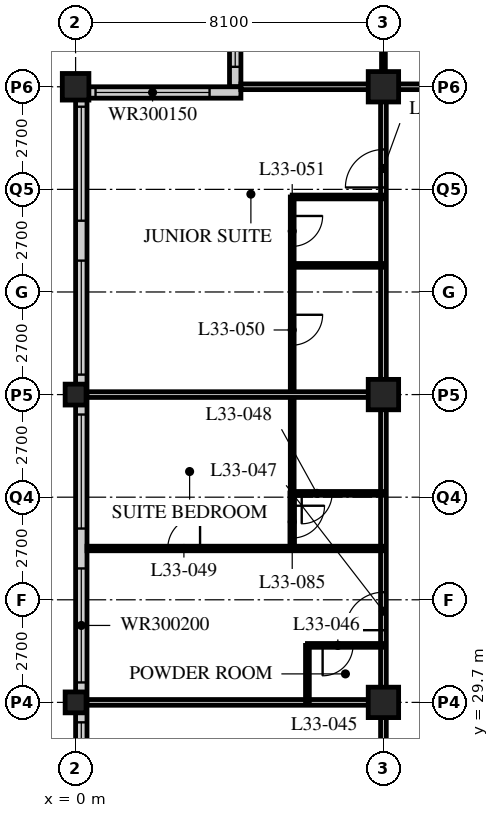
"""IFC4 building model, lengths in metres.
Left out: names, types, materials, properties, quantities, classifications, styles, units other than length and angle.
Written with IfcOpenShell. Run it as: python <this file> out.ifc"""

import sys

from ifc_helpers import new_model, si_unit, direction, frame, frame_2d, origin, origin_2d, place, context, subcontext, project, spatial, rectangle, hollow_rectangle, extrude, element, fill, save


model = new_model("IFC4")
c1 = context("Model", 3, precision=1e-05, world=origin(), true_north=direction((0.0, 1.0)))
c2 = subcontext(c1, "Body", "Model", "MODEL_VIEW")
j1 = project(units=[si_unit("LENGTHUNIT", "METRE"), si_unit("PLANEANGLEUNIT", "RADIAN")], contexts=[c1])
p1 = place(None, origin())
s1 = spatial("IfcSite", under=j1, at=p1, CompositionType="ELEMENT")
p2 = place(p1, origin())
s2 = spatial("IfcBuilding", under=s1, at=p2, CompositionType="ELEMENT")
p3 = place(p2, frame((0.0, 0.0, 130.6)))
s3 = spatial("IfcBuildingStorey", under=s2, at=p3, CompositionType="ELEMENT", Elevation=130.6)
for number, where, z_axis, x_axis in (
    (1, (0.0, 29.7, 0.0), (0.0, 0.0, 1.0), (1.0, 0.0, 0.0)),
    (2, (0.0, 37.8, 0.0), (0.0, 0.0, 1.0), (1.0, 0.0, 0.0)),
):
    element("IfcColumn", number, at=place(p3, frame(where, z_axis=z_axis, x_axis=x_axis)), inside=s3, PredefinedType="COLUMN", context=c2, shape_type="SweptSolid", body=[
        extrude(hollow_rectangle(XDim=0.55, YDim=0.55, WallThickness=0.04, at=origin_2d()), origin(), (0.0, 0.0, 1.0), 3.4),
    ])
p4 = place(p3, frame((0.0, 45.9, 0.0), z_axis=(0.0, 0.0, 1.0), x_axis=(1.0, 0.0, 0.0)))
e3 = element("IfcColumn", 3, at=p4, inside=s3, PredefinedType="COLUMN", context=c2, shape_type="SweptSolid", body=[
    extrude(hollow_rectangle(XDim=0.7, YDim=0.7, WallThickness=0.07, at=origin_2d()), origin(), (0.0, 0.0, 1.0), 3.4),
])
for number, where, z_axis, x_axis in (
    (4, (8.1, 29.7, 0.0), (0.0, 0.0, 1.0), (1.0, 0.0, 0.0)),
    (5, (8.1, 37.8, 0.0), (0.0, 0.0, 1.0), (1.0, 0.0, 0.0)),
    (6, (8.1, 45.9, 0.0), (0.0, 0.0, 1.0), (1.0, 0.0, 0.0)),
):
    element("IfcColumn", number, at=place(p3, frame(where, z_axis=z_axis, x_axis=x_axis)), inside=s3, PredefinedType="COLUMN", context=c2, shape_type="SweptSolid", body=[
        extrude(hollow_rectangle(XDim=0.8, YDim=0.8, WallThickness=0.08, at=origin_2d()), origin(), (0.0, 0.0, 1.0), 3.4),
    ])
p5 = place(p3, frame((4.2, 49.65, 0.0), z_axis=(0.0, 0.0, 1.0), x_axis=(0.0, -1.0, 0.0)))
e7 = element("IfcWall", 7, at=p5, inside=s3, PredefinedType="SOLIDWALL", context=c2, shape_type="SweptSolid", body=[
    extrude(rectangle(XDim=3.75, YDim=0.3, at=frame_2d((1.875, 0.0))), origin(), (0.0, 0.0, 1.0), 3.19),
])
p6 = place(p5, frame((0.225, 0.0, 0.9)))
e8 = element("IfcOpeningElement", 8, at=p6, cuts=e7, PredefinedType="OPENING", context=c2, shape_type="SweptSolid", body=[
    extrude(rectangle(XDim=3.0, YDim=1.5, at=frame_2d((1.5, 0.75))), frame((0.0, 0.16, 0.0), z_axis=(0.0, -1.0, 0.0), x_axis=(1.0, 0.0, 0.0)), (0.0, 0.0, 1.0), 0.32),
])
p7 = place(p3, frame((4.35, 45.75, 0.0), z_axis=(0.0, 0.0, 1.0), x_axis=(-1.0, 0.0, 0.0)))
e9 = element("IfcWall", 9, at=p7, inside=s3, PredefinedType="SOLIDWALL", context=c2, shape_type="SweptSolid", body=[
    extrude(rectangle(XDim=4.35, YDim=0.3, at=frame_2d((2.175, 0.0))), origin(), (0.0, 0.0, 1.0), 3.19),
])
p8 = place(p7, frame((0.825, 0.0, 0.9)))
e10 = element("IfcOpeningElement", 10, at=p8, cuts=e9, PredefinedType="OPENING", context=c2, shape_type="SweptSolid", body=[
    extrude(rectangle(XDim=3.0, YDim=1.5, at=frame_2d((1.5, 0.75))), frame((0.0, 0.16, 0.0), z_axis=(0.0, -1.0, 0.0), x_axis=(1.0, 0.0, 0.0)), (0.0, 0.0, 1.0), 0.32),
])
p9 = place(p3, frame((0.15, 45.6, 0.0), z_axis=(0.0, 0.0, 1.0), x_axis=(0.0, -1.0, 0.0)))
e11 = element("IfcWall", 11, at=p9, inside=s3, PredefinedType="SOLIDWALL", context=c2, shape_type="SweptSolid", body=[
    extrude(rectangle(XDim=32.1, YDim=0.3, at=frame_2d((16.05, 0.0))), origin(), (0.0, 0.0, 1.0), 3.19),
])
p10 = place(p9, frame((0.225, 0.0, 0.9)))
e12 = element("IfcOpeningElement", 12, at=p10, cuts=e11, PredefinedType="OPENING", context=c2, shape_type="SweptSolid", body=[
    extrude(rectangle(XDim=3.0, YDim=2.0, at=frame_2d((1.5, 1.0))), frame((0.0, 0.16, 0.0), z_axis=(0.0, -1.0, 0.0), x_axis=(1.0, 0.0, 0.0)), (0.0, 0.0, 1.0), 0.32),
])
p11 = place(p9, frame((4.275, 0.0, 0.9)))
e13 = element("IfcOpeningElement", 13, at=p11, cuts=e11, PredefinedType="OPENING", context=c2, shape_type="SweptSolid", body=[
    extrude(rectangle(XDim=3.0, YDim=2.0, at=frame_2d((1.5, 1.0))), frame((0.0, 0.16, 0.0), z_axis=(0.0, -1.0, 0.0), x_axis=(1.0, 0.0, 0.0)), (0.0, 0.0, 1.0), 0.32),
])
p12 = place(p9, frame((8.325, 0.0, 0.9)))
e14 = element("IfcOpeningElement", 14, at=p12, cuts=e11, PredefinedType="OPENING", context=c2, shape_type="SweptSolid", body=[
    extrude(rectangle(XDim=3.0, YDim=2.0, at=frame_2d((1.5, 1.0))), frame((0.0, 0.16, 0.0), z_axis=(0.0, -1.0, 0.0), x_axis=(1.0, 0.0, 0.0)), (0.0, 0.0, 1.0), 0.32),
])
p13 = place(p9, frame((12.375, 0.0, 0.9)))
e15 = element("IfcOpeningElement", 15, at=p13, cuts=e11, PredefinedType="OPENING", context=c2, shape_type="SweptSolid", body=[
    extrude(rectangle(XDim=3.0, YDim=2.0, at=frame_2d((1.5, 1.0))), frame((0.0, 0.16, 0.0), z_axis=(0.0, -1.0, 0.0), x_axis=(1.0, 0.0, 0.0)), (0.0, 0.0, 1.0), 0.32),
])
p14 = place(p9, frame((16.425, 0.0, 0.9)))
e16 = element("IfcOpeningElement", 16, at=p14, cuts=e11, PredefinedType="OPENING", context=c2, shape_type="SweptSolid", body=[
    extrude(rectangle(XDim=3.0, YDim=2.0, at=frame_2d((1.5, 1.0))), frame((0.0, 0.16, 0.0), z_axis=(0.0, -1.0, 0.0), x_axis=(1.0, 0.0, 0.0)), (0.0, 0.0, 1.0), 0.32),
])
p15 = place(p9, frame((20.475, 0.0, 0.9)))
e17 = element("IfcOpeningElement", 17, at=p15, cuts=e11, PredefinedType="OPENING", context=c2, shape_type="SweptSolid", body=[
    extrude(rectangle(XDim=3.0, YDim=2.0, at=frame_2d((1.5, 1.0))), frame((0.0, 0.16, 0.0), z_axis=(0.0, -1.0, 0.0), x_axis=(1.0, 0.0, 0.0)), (0.0, 0.0, 1.0), 0.32),
])
p16 = place(p9, frame((24.525, 0.0, 0.9)))
e18 = element("IfcOpeningElement", 18, at=p16, cuts=e11, PredefinedType="OPENING", context=c2, shape_type="SweptSolid", body=[
    extrude(rectangle(XDim=3.0, YDim=2.0, at=frame_2d((1.5, 1.0))), frame((0.0, 0.16, 0.0), z_axis=(0.0, -1.0, 0.0), x_axis=(1.0, 0.0, 0.0)), (0.0, 0.0, 1.0), 0.32),
])
p17 = place(p9, frame((28.575, 0.0, 0.9)))
e19 = element("IfcOpeningElement", 19, at=p17, cuts=e11, PredefinedType="OPENING", context=c2, shape_type="SweptSolid", body=[
    extrude(rectangle(XDim=3.0, YDim=2.0, at=frame_2d((1.5, 1.0))), frame((0.0, 0.16, 0.0), z_axis=(0.0, -1.0, 0.0), x_axis=(1.0, 0.0, 0.0)), (0.0, 0.0, 1.0), 0.32),
])
p18 = place(p3, frame((8.1, 45.9, 0.0), z_axis=(0.0, 0.0, 1.0), x_axis=(1.0, 0.0, 0.0)))
e20 = element("IfcWall", 20, at=p18, inside=s3, PredefinedType="PARTITIONING", context=c2, shape_type="SweptSolid", body=[
    extrude(rectangle(XDim=40.5, YDim=0.15, at=frame_2d((20.25, 0.0))), origin(), (0.0, 0.0, 1.0), 2.578),
])
p19 = place(p18, frame((9.625, 0.0, 0.0)))
e21 = element("IfcOpeningElement", 21, at=p19, cuts=e20, PredefinedType="OPENING", context=c2, shape_type="SweptSolid", body=[
    extrude(rectangle(XDim=1.0, YDim=2.1, at=frame_2d((0.5, 1.05))), frame((0.0, 0.085, 0.0), z_axis=(0.0, -1.0, 0.0), x_axis=(1.0, 0.0, 0.0)), (0.0, 0.0, 1.0), 0.17),
])
p20 = place(p18, frame((21.65, 0.0, 0.0)))
e22 = element("IfcOpeningElement", 22, at=p20, cuts=e20, PredefinedType="OPENING", context=c2, shape_type="SweptSolid", body=[
    extrude(rectangle(XDim=1.0, YDim=2.1, at=frame_2d((0.5, 1.05))), frame((0.0, 0.085, 0.0), z_axis=(0.0, -1.0, 0.0), x_axis=(1.0, 0.0, 0.0)), (0.0, 0.0, 1.0), 0.17),
])
p21 = place(p18, frame((26.75, 0.0, 0.0)))
e23 = element("IfcOpeningElement", 23, at=p21, cuts=e20, PredefinedType="OPENING", context=c2, shape_type="SweptSolid", body=[
    extrude(rectangle(XDim=1.0, YDim=2.1, at=frame_2d((0.5, 1.05))), frame((0.0, 0.085, 0.0), z_axis=(0.0, -1.0, 0.0), x_axis=(1.0, 0.0, 0.0)), (0.0, 0.0, 1.0), 0.17),
])
p22 = place(p18, frame((28.95, 0.0, 0.0)))
e24 = element("IfcOpeningElement", 24, at=p22, cuts=e20, PredefinedType="OPENING", context=c2, shape_type="SweptSolid", body=[
    extrude(rectangle(XDim=1.0, YDim=2.1, at=frame_2d((0.5, 1.05))), frame((0.0, 0.085, 0.0), z_axis=(0.0, -1.0, 0.0), x_axis=(1.0, 0.0, 0.0)), (0.0, 0.0, 1.0), 0.17),
])
p23 = place(p18, frame((34.85, 0.0, 0.0)))
e25 = element("IfcOpeningElement", 25, at=p23, cuts=e20, PredefinedType="OPENING", context=c2, shape_type="SweptSolid", body=[
    extrude(rectangle(XDim=1.0, YDim=2.1, at=frame_2d((0.5, 1.05))), frame((0.0, 0.085, 0.0), z_axis=(0.0, -1.0, 0.0), x_axis=(1.0, 0.0, 0.0)), (0.0, 0.0, 1.0), 0.17),
])
p24 = place(p18, frame((36.875, 0.0, 0.0)))
e26 = element("IfcOpeningElement", 26, at=p24, cuts=e20, PredefinedType="OPENING", context=c2, shape_type="SweptSolid", body=[
    extrude(rectangle(XDim=1.0, YDim=2.1, at=frame_2d((0.5, 1.05))), frame((0.0, 0.085, 0.0), z_axis=(0.0, -1.0, 0.0), x_axis=(1.0, 0.0, 0.0)), (0.0, 0.0, 1.0), 0.17),
])
p25 = place(p18, frame((2.625, 0.0, 0.0)))
e27 = element("IfcOpeningElement", 27, at=p25, cuts=e20, PredefinedType="OPENING", context=c2, shape_type="SweptSolid", body=[
    extrude(rectangle(XDim=1.0, YDim=2.1, at=frame_2d((0.5, 1.05))), frame((0.0, 0.085, 0.0), z_axis=(0.0, -1.0, 0.0), x_axis=(1.0, 0.0, 0.0)), (0.0, 0.0, 1.0), 0.17),
])
p26 = place(p3, frame((8.1, 21.6, 0.0), z_axis=(0.0, 0.0, 1.0), x_axis=(0.0, 1.0, 0.0)))
e28 = element("IfcWall", 28, at=p26, inside=s3, PredefinedType="PARTITIONING", context=c2, shape_type="SweptSolid", body=[
    extrude(rectangle(XDim=24.3, YDim=0.15, at=frame_2d((12.15, 0.0))), origin(), (0.0, 0.0, 1.0), 2.578),
])
p27 = place(p26, frame((5.45, 0.0, 0.0)))
e29 = element("IfcOpeningElement", 29, at=p27, cuts=e28, PredefinedType="OPENING", context=c2, shape_type="SweptSolid", body=[
    extrude(rectangle(XDim=1.0, YDim=2.1, at=frame_2d((0.5, 1.05))), frame((0.0, 0.085, 0.0), z_axis=(0.0, -1.0, 0.0), x_axis=(1.0, 0.0, 0.0)), (0.0, 0.0, 1.0), 0.17),
])
p28 = place(p26, frame((10.0, 0.0, 0.0)))
e30 = element("IfcOpeningElement", 30, at=p28, cuts=e28, PredefinedType="OPENING", context=c2, shape_type="SweptSolid", body=[
    extrude(rectangle(XDim=1.0, YDim=2.1, at=frame_2d((0.5, 1.05))), frame((0.0, 0.085, 0.0), z_axis=(0.0, -1.0, 0.0), x_axis=(1.0, 0.0, 0.0)), (0.0, 0.0, 1.0), 0.17),
])
p29 = place(p26, frame((21.65, 0.0, 0.0)))
e31 = element("IfcOpeningElement", 31, at=p29, cuts=e28, PredefinedType="OPENING", context=c2, shape_type="SweptSolid", body=[
    extrude(rectangle(XDim=1.0, YDim=2.1, at=frame_2d((0.5, 1.05))), frame((0.0, 0.085, 0.0), z_axis=(0.0, -1.0, 0.0), x_axis=(1.0, 0.0, 0.0)), (0.0, 0.0, 1.0), 0.17),
])
p30 = place(p3, frame((8.1, 29.7, 0.0), z_axis=(0.0, 0.0, 1.0), x_axis=(-1.0, 0.0, 0.0)))
e32 = element("IfcWall", 32, at=p30, inside=s3, PredefinedType="PARTITIONING", context=c2, shape_type="SweptSolid", body=[
    extrude(rectangle(XDim=7.8, YDim=0.15, at=frame_2d((3.9, 0.0))), origin(), (0.0, 0.0, 1.0), 2.578),
])
p31 = place(p3, frame((6.1, 29.7, 0.0), z_axis=(0.0, 0.0, 1.0), x_axis=(0.0, 1.0, 0.0)))
e33 = element("IfcWall", 33, at=p31, inside=s3, PredefinedType="PARTITIONING", context=c2, shape_type="SweptSolid", body=[
    extrude(rectangle(XDim=1.5, YDim=0.1, at=frame_2d((0.75, 0.0))), origin(), (0.0, 0.0, 1.0), 3.19),
])
p32 = place(p3, frame((8.1, 31.2, 0.0), z_axis=(0.0, 0.0, 1.0), x_axis=(-1.0, 0.0, 0.0)))
e34 = element("IfcWall", 34, at=p32, inside=s3, PredefinedType="PARTITIONING", context=c2, shape_type="SweptSolid", body=[
    extrude(rectangle(XDim=2.0, YDim=0.1, at=frame_2d((1.0, 0.0))), origin(), (0.0, 0.0, 1.0), 3.19),
])
p33 = place(p32, frame((0.8, 0.0, 0.0)))
e35 = element("IfcOpeningElement", 35, at=p33, cuts=e34, PredefinedType="OPENING", context=c2, shape_type="SweptSolid", body=[
    extrude(rectangle(XDim=0.8, YDim=2.1, at=frame_2d((0.4, 1.05))), frame((0.0, 0.06, 0.0), z_axis=(0.0, -1.0, 0.0), x_axis=(1.0, 0.0, 0.0)), (0.0, 0.0, 1.0), 0.12),
])
p34 = place(p3, frame((5.7, 35.2, 0.0), z_axis=(0.0, 0.0, 1.0), x_axis=(0.0, 1.0, 0.0)))
e36 = element("IfcWall", 36, at=p34, inside=s3, PredefinedType="PARTITIONING", context=c2, shape_type="SweptSolid", body=[
    extrude(rectangle(XDim=7.8, YDim=0.1, at=frame_2d((3.9, 0.0))), origin(), (0.0, 0.0, 1.0), 3.19),
])
p35 = place(p34, frame((3.9, 0.0, 0.0)))
e37 = element("IfcOpeningElement", 37, at=p35, cuts=e36, PredefinedType="OPENING", context=c2, shape_type="SweptSolid", body=[
    extrude(rectangle(XDim=0.8, YDim=2.1, at=frame_2d((0.4, 1.05))), frame((0.0, 0.06, 0.0), z_axis=(0.0, -1.0, 0.0), x_axis=(1.0, 0.0, 0.0)), (0.0, 0.0, 1.0), 0.12),
])
p36 = place(p34, frame((6.5, 0.0, 0.0)))
e38 = element("IfcOpeningElement", 38, at=p36, cuts=e36, PredefinedType="OPENING", context=c2, shape_type="SweptSolid", body=[
    extrude(rectangle(XDim=0.8, YDim=2.1, at=frame_2d((0.4, 1.05))), frame((0.0, 0.06, 0.0), z_axis=(0.0, -1.0, 0.0), x_axis=(1.0, 0.0, 0.0)), (0.0, 0.0, 1.0), 0.12),
])
p37 = place(p3, frame((8.1, 35.2, 0.0), z_axis=(0.0, 0.0, 1.0), x_axis=(-1.0, 0.0, 0.0)))
e39 = element("IfcWall", 39, at=p37, inside=s3, PredefinedType="PARTITIONING", context=c2, shape_type="SweptSolid", body=[
    extrude(rectangle(XDim=2.4, YDim=0.1, at=frame_2d((1.2, 0.0))), origin(), (0.0, 0.0, 1.0), 3.19),
])
p38 = place(p37, frame((1.35, 0.0, 0.0)))
e40 = element("IfcOpeningElement", 40, at=p38, cuts=e39, PredefinedType="OPENING", context=c2, shape_type="SweptSolid", body=[
    extrude(rectangle(XDim=0.8, YDim=2.1, at=frame_2d((0.4, 1.05))), frame((0.0, 0.06, 0.0), z_axis=(0.0, -1.0, 0.0), x_axis=(1.0, 0.0, 0.0)), (0.0, 0.0, 1.0), 0.12),
])
p39 = place(p3, frame((8.1, 33.75, 0.0), z_axis=(0.0, 0.0, 1.0), x_axis=(-1.0, 0.0, 0.0)))
e41 = element("IfcWall", 41, at=p39, inside=s3, PredefinedType="PARTITIONING", context=c2, shape_type="SweptSolid", body=[
    extrude(rectangle(XDim=7.8, YDim=0.12, at=frame_2d((3.9, 0.0))), origin(), (0.0, 0.0, 1.0), 3.19),
])
p40 = place(p39, frame((4.825, 0.0, 0.0)))
e42 = element("IfcOpeningElement", 42, at=p40, cuts=e41, PredefinedType="OPENING", context=c2, shape_type="SweptSolid", body=[
    extrude(rectangle(XDim=0.85, YDim=2.1, at=frame_2d((0.425, 1.05))), frame((0.0, 0.07, 0.0), z_axis=(0.0, -1.0, 0.0), x_axis=(1.0, 0.0, 0.0)), (0.0, 0.0, 1.0), 0.14),
])
p41 = place(p3, frame((8.1, 37.8, 0.0), z_axis=(0.0, 0.0, 1.0), x_axis=(-1.0, 0.0, 0.0)))
e43 = element("IfcWall", 43, at=p41, inside=s3, PredefinedType="PARTITIONING", context=c2, shape_type="SweptSolid", body=[
    extrude(rectangle(XDim=7.8, YDim=0.15, at=frame_2d((3.9, 0.0))), origin(), (0.0, 0.0, 1.0), 2.578),
])
for number, where, z_axis, x_axis in (
    (44, (8.1, 41.2, 0.0), (0.0, 0.0, 1.0), (-1.0, 0.0, 0.0)),
    (45, (8.1, 43.0, 0.0), (0.0, 0.0, 1.0), (-1.0, 0.0, 0.0)),
):
    element("IfcWall", number, at=place(p3, frame(where, z_axis=z_axis, x_axis=x_axis)), inside=s3, PredefinedType="PARTITIONING", context=c2, shape_type="SweptSolid", body=[
        extrude(rectangle(XDim=2.4, YDim=0.1, at=frame_2d((1.2, 0.0))), origin(), (0.0, 0.0, 1.0), 3.19),
    ])
p42 = place(p3, frame((8.1, 45.9, 0.0), z_axis=(0.0, 0.0, 1.0), x_axis=(0.0, 1.0, 0.0)))
e46 = element("IfcWall", 46, at=p42, inside=s3, PredefinedType="PARTITIONING", context=c2, shape_type="SweptSolid", body=[
    extrude(rectangle(XDim=2.4, YDim=0.1, at=frame_2d((1.2, 0.0))), origin(), (0.0, 0.0, 1.0), 2.578),
])
p43 = place(p3, frame((4.35, 45.9, 0.0), z_axis=(0.0, 0.0, 1.0), x_axis=(1.0, 0.0, 0.0)))
e47 = element("IfcWall", 47, at=p43, inside=s3, PredefinedType="PARTITIONING", context=c2, shape_type="SweptSolid", body=[
    extrude(rectangle(XDim=3.75, YDim=0.15, at=frame_2d((1.875, 0.0))), origin(), (0.0, 0.0, 1.0), 2.578),
])
p44 = place(p3, frame((5.7, 33.75, 0.0), z_axis=(0.0, 0.0, 1.0), x_axis=(0.0, 1.0, 0.0)))
e48 = element("IfcWall", 48, at=p44, inside=s3, PredefinedType="PARTITIONING", context=c2, shape_type="SweptSolid", body=[
    extrude(rectangle(XDim=1.46, YDim=0.12, at=frame_2d((0.73, 0.0))), origin(), (0.0, 0.0, 1.0), 3.19),
])
p45 = place(p44, frame((0.275, 0.0, 0.0)))
e49 = element("IfcOpeningElement", 49, at=p45, cuts=e48, PredefinedType="OPENING", context=c2, shape_type="SweptSolid", body=[
    extrude(rectangle(XDim=0.85, YDim=2.1, at=frame_2d((0.425, 1.05))), frame((0.0, 0.07, 0.0), z_axis=(0.0, -1.0, 0.0), x_axis=(1.0, 0.0, 0.0)), (0.0, 0.0, 1.0), 0.14),
])
p46 = place(p6, origin())
e50 = element("IfcWindow", 50, at=p46, inside=s3, PartitioningType="SINGLE_PANEL", PredefinedType="WINDOW", context=c2, shape_type="SweptSolid", body=[
    extrude(rectangle(XDim=3.0, YDim=1.5, at=frame_2d((1.5, 0.75))), frame((0.0, 0.03, 0.0), z_axis=(0.0, -1.0, 0.0), x_axis=(1.0, 0.0, 0.0)), (0.0, 0.0, 1.0), 0.06),
])
fill(e8, e50)
p47 = place(p8, origin())
e51 = element("IfcWindow", 51, at=p47, inside=s3, PartitioningType="SINGLE_PANEL", PredefinedType="WINDOW", context=c2, shape_type="SweptSolid", body=[
    extrude(rectangle(XDim=3.0, YDim=1.5, at=frame_2d((1.5, 0.75))), frame((0.0, 0.03, 0.0), z_axis=(0.0, -1.0, 0.0), x_axis=(1.0, 0.0, 0.0)), (0.0, 0.0, 1.0), 0.06),
])
fill(e10, e51)
p48 = place(p10, origin())
e52 = element("IfcWindow", 52, at=p48, inside=s3, PartitioningType="SINGLE_PANEL", PredefinedType="WINDOW", context=c2, shape_type="SweptSolid", body=[
    extrude(rectangle(XDim=3.0, YDim=2.0, at=frame_2d((1.5, 1.0))), frame((0.0, 0.03, 0.0), z_axis=(0.0, -1.0, 0.0), x_axis=(1.0, 0.0, 0.0)), (0.0, 0.0, 1.0), 0.06),
])
fill(e12, e52)
p49 = place(p11, origin())
e53 = element("IfcWindow", 53, at=p49, inside=s3, PartitioningType="SINGLE_PANEL", PredefinedType="WINDOW", context=c2, shape_type="SweptSolid", body=[
    extrude(rectangle(XDim=3.0, YDim=2.0, at=frame_2d((1.5, 1.0))), frame((0.0, 0.03, 0.0), z_axis=(0.0, -1.0, 0.0), x_axis=(1.0, 0.0, 0.0)), (0.0, 0.0, 1.0), 0.06),
])
fill(e13, e53)
p50 = place(p12, origin())
e54 = element("IfcWindow", 54, at=p50, inside=s3, PartitioningType="SINGLE_PANEL", PredefinedType="WINDOW", context=c2, shape_type="SweptSolid", body=[
    extrude(rectangle(XDim=3.0, YDim=2.0, at=frame_2d((1.5, 1.0))), frame((0.0, 0.03, 0.0), z_axis=(0.0, -1.0, 0.0), x_axis=(1.0, 0.0, 0.0)), (0.0, 0.0, 1.0), 0.06),
])
fill(e14, e54)
p51 = place(p13, origin())
e55 = element("IfcWindow", 55, at=p51, inside=s3, PartitioningType="SINGLE_PANEL", PredefinedType="WINDOW", context=c2, shape_type="SweptSolid", body=[
    extrude(rectangle(XDim=3.0, YDim=2.0, at=frame_2d((1.5, 1.0))), frame((0.0, 0.03, 0.0), z_axis=(0.0, -1.0, 0.0), x_axis=(1.0, 0.0, 0.0)), (0.0, 0.0, 1.0), 0.06),
])
fill(e15, e55)
p52 = place(p14, origin())
e56 = element("IfcWindow", 56, at=p52, inside=s3, PartitioningType="SINGLE_PANEL", PredefinedType="WINDOW", context=c2, shape_type="SweptSolid", body=[
    extrude(rectangle(XDim=3.0, YDim=2.0, at=frame_2d((1.5, 1.0))), frame((0.0, 0.03, 0.0), z_axis=(0.0, -1.0, 0.0), x_axis=(1.0, 0.0, 0.0)), (0.0, 0.0, 1.0), 0.06),
])
fill(e16, e56)
p53 = place(p33, origin())
e57 = element("IfcDoor", 57, at=p53, inside=s3, OperationType="SINGLE_SWING_RIGHT", PredefinedType="DOOR", context=c2, shape_type="SweptSolid", body=[
    extrude(rectangle(XDim=0.8, YDim=2.1, at=frame_2d((0.4, 1.05))), frame((0.0, 0.025, 0.0), z_axis=(0.0, -1.0, 0.0), x_axis=(1.0, 0.0, 0.0)), (0.0, 0.0, 1.0), 0.05),
])
fill(e35, e57)
p54 = place(p28, origin())
e58 = element("IfcDoor", 58, at=p54, inside=s3, OperationType="SINGLE_SWING_LEFT", PredefinedType="DOOR", context=c2, shape_type="SweptSolid", body=[
    extrude(rectangle(XDim=1.0, YDim=2.1, at=frame_2d((0.5, 1.05))), frame((0.0, 0.025, 0.0), z_axis=(0.0, -1.0, 0.0), x_axis=(1.0, 0.0, 0.0)), (0.0, 0.0, 1.0), 0.05),
])
fill(e30, e58)
p55 = place(p38, origin())
e59 = element("IfcDoor", 59, at=p55, inside=s3, OperationType="SINGLE_SWING_RIGHT", PredefinedType="DOOR", context=c2, shape_type="SweptSolid", body=[
    extrude(rectangle(XDim=0.8, YDim=2.1, at=frame_2d((0.4, 1.05))), frame((0.0, 0.025, 0.0), z_axis=(0.0, -1.0, 0.0), x_axis=(1.0, 0.0, 0.0)), (0.0, 0.0, 1.0), 0.05),
])
fill(e40, e59)
p56 = place(p40, origin())
e60 = element("IfcDoor", 60, at=p56, inside=s3, OperationType="SINGLE_SWING_RIGHT", PredefinedType="DOOR", context=c2, shape_type="SweptSolid", body=[
    extrude(rectangle(XDim=0.85, YDim=2.1, at=frame_2d((0.425, 1.05))), frame((0.0, 0.025, 0.0), z_axis=(0.0, -1.0, 0.0), x_axis=(1.0, 0.0, 0.0)), (0.0, 0.0, 1.0), 0.05),
])
fill(e42, e60)
p57 = place(p35, origin())
e61 = element("IfcDoor", 61, at=p57, inside=s3, OperationType="SINGLE_SWING_LEFT", PredefinedType="DOOR", context=c2, shape_type="SweptSolid", body=[
    extrude(rectangle(XDim=0.8, YDim=2.1, at=frame_2d((0.4, 1.05))), frame((0.0, 0.025, 0.0), z_axis=(0.0, -1.0, 0.0), x_axis=(1.0, 0.0, 0.0)), (0.0, 0.0, 1.0), 0.05),
])
fill(e37, e61)
p58 = place(p36, origin())
e62 = element("IfcDoor", 62, at=p58, inside=s3, OperationType="SINGLE_SWING_LEFT", PredefinedType="DOOR", context=c2, shape_type="SweptSolid", body=[
    extrude(rectangle(XDim=0.8, YDim=2.1, at=frame_2d((0.4, 1.05))), frame((0.0, 0.025, 0.0), z_axis=(0.0, -1.0, 0.0), x_axis=(1.0, 0.0, 0.0)), (0.0, 0.0, 1.0), 0.05),
])
fill(e38, e62)
p59 = place(p29, origin())
e63 = element("IfcDoor", 63, at=p59, inside=s3, OperationType="SINGLE_SWING_LEFT", PredefinedType="DOOR", context=c2, shape_type="SweptSolid", body=[
    extrude(rectangle(XDim=1.0, YDim=2.1, at=frame_2d((0.5, 1.05))), frame((0.0, 0.025, 0.0), z_axis=(0.0, -1.0, 0.0), x_axis=(1.0, 0.0, 0.0)), (0.0, 0.0, 1.0), 0.05),
])
fill(e31, e63)
p60 = place(p45, origin())
e64 = element("IfcDoor", 64, at=p60, inside=s3, OperationType="SINGLE_SWING_LEFT", PredefinedType="DOOR", context=c2, shape_type="SweptSolid", body=[
    extrude(rectangle(XDim=0.85, YDim=2.1, at=frame_2d((0.425, 1.05))), frame((0.0, 0.025, 0.0), z_axis=(0.0, -1.0, 0.0), x_axis=(1.0, 0.0, 0.0)), (0.0, 0.0, 1.0), 0.05),
])
fill(e49, e64)
save(model, sys.argv[1])
